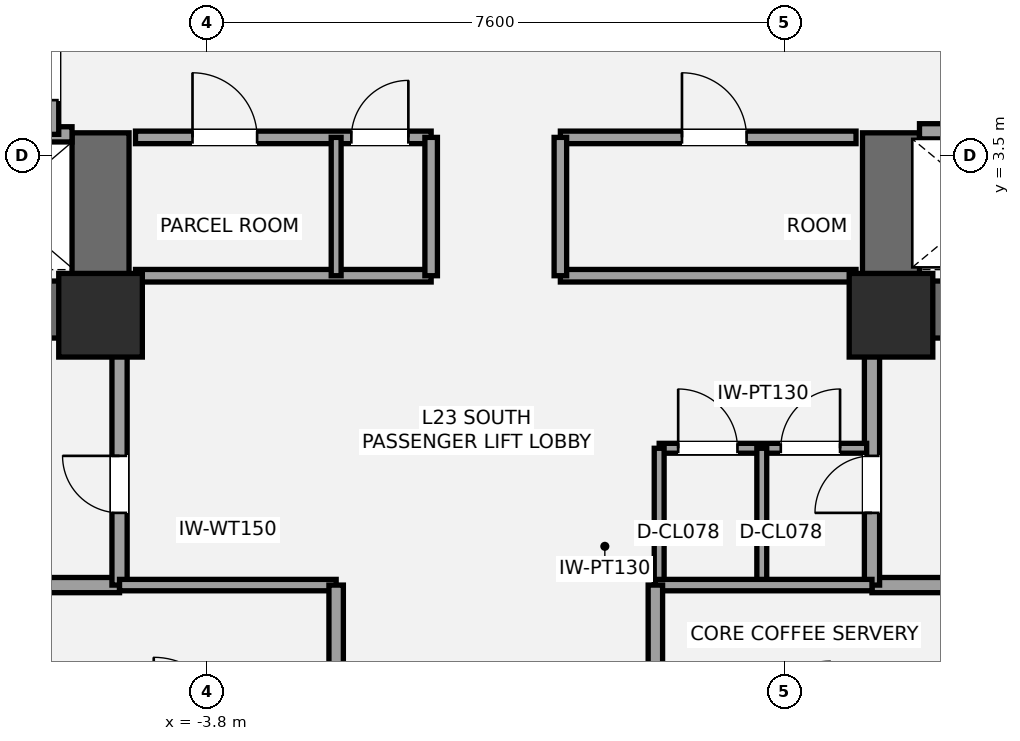
"""IFC4 building model, lengths in metres.
Left out: names, types, materials, properties, quantities, classifications, styles, units other than length and angle.
Written with IfcOpenShell. Run it as: python <this file> out.ifc"""

import sys

from ifc_helpers import new_model, si_unit, direction, frame, frame_2d, origin, origin_2d, place, context, subcontext, project, spatial, rectangle, extrude, element, fill, save


model = new_model("IFC4")
c1 = context("Model", 3, precision=1e-05, world=origin(), true_north=direction((0.0, 1.0)))
c2 = subcontext(c1, "Body", "Model", "MODEL_VIEW")
j1 = project(units=[si_unit("LENGTHUNIT", "METRE"), si_unit("PLANEANGLEUNIT", "RADIAN")], contexts=[c1])
p1 = place(None, origin())
s1 = spatial("IfcSite", under=j1, at=p1, CompositionType="ELEMENT")
p2 = place(p1, origin())
s2 = spatial("IfcBuilding", under=s1, at=p2, CompositionType="ELEMENT")
p3 = place(p2, frame((0.0, 0.0, 89.6)))
s3 = spatial("IfcBuildingStorey", under=s2, at=p3, CompositionType="ELEMENT", Elevation=89.6)
p4 = place(p3, frame((-4.825, 1.475, 0.0), z_axis=(0.0, 0.0, 1.0), x_axis=(-1.0, 0.0, 0.0)))
e1 = element("IfcWall", 1, at=p4, inside=s3, PredefinedType="SHEAR", context=c2, shape_type="SweptSolid", body=[
    extrude(rectangle(XDim=9.075, YDim=0.75, at=frame_2d((4.538, 0.0))), origin(), (0.0, 0.0, 1.0), 3.5),
])
p5 = place(p4, frame((5.475, 0.0, 0.0)))
e2 = element("IfcOpeningElement", 2, at=p5, cuts=e1, PredefinedType="OPENING", context=c2, shape_type="SweptSolid", body=[
    extrude(rectangle(XDim=1.05, YDim=2.15, at=frame_2d((0.525, 1.075))), frame((0.0, 0.385, 0.0), z_axis=(0.0, -1.0, 0.0), x_axis=(1.0, 0.0, 0.0)), (0.0, 0.0, 1.0), 0.77),
])
p6 = place(p4, frame((3.805, 0.0, 0.0)))
e3 = element("IfcOpeningElement", 3, at=p6, cuts=e1, PredefinedType="OPENING", context=c2, shape_type="SweptSolid", body=[
    extrude(rectangle(XDim=1.1, YDim=2.2, at=frame_2d((0.55, 1.1))), frame((0.0, 0.385, 0.0), z_axis=(0.0, -1.0, 0.0), x_axis=(1.0, 0.0, 0.0)), (0.0, 0.0, 1.0), 0.77),
])
p7 = place(p3, frame((-5.2, 1.1, 0.0), z_axis=(0.0, 0.0, 1.0), x_axis=(0.0, 1.0, 0.0)))
e4 = element("IfcWall", 4, at=p7, inside=s3, PredefinedType="SHEAR", context=c2, shape_type="SweptSolid", body=[
    extrude(rectangle(XDim=2.7, YDim=0.75, at=frame_2d((1.35, 0.0))), origin(), (0.0, 0.0, 1.0), 3.5),
])
p8 = place(p3, frame((13.9, 1.475, 0.0), z_axis=(0.0, 0.0, 1.0), x_axis=(-1.0, 0.0, 0.0)))
e5 = element("IfcWall", 5, at=p8, inside=s3, PredefinedType="SHEAR", context=c2, shape_type="SweptSolid", body=[
    extrude(rectangle(XDim=9.075, YDim=0.75, at=frame_2d((4.538, 0.0))), origin(), (0.0, 0.0, 1.0), 3.5),
])
p9 = place(p8, frame((2.55, 0.0, 0.0)))
e6 = element("IfcOpeningElement", 6, at=p9, cuts=e5, PredefinedType="OPENING", context=c2, shape_type="SweptSolid", body=[
    extrude(rectangle(XDim=1.05, YDim=2.15, at=frame_2d((0.525, 1.075))), frame((0.0, 0.385, 0.0), z_axis=(0.0, -1.0, 0.0), x_axis=(1.0, 0.0, 0.0)), (0.0, 0.0, 1.0), 0.77),
])
p10 = place(p8, frame((4.55, 0.0, 0.0)))
e7 = element("IfcOpeningElement", 7, at=p10, cuts=e5, PredefinedType="OPENING", context=c2, shape_type="SweptSolid", body=[
    extrude(rectangle(XDim=1.1, YDim=2.2, at=frame_2d((0.55, 1.1))), frame((0.0, 0.385, 0.0), z_axis=(0.0, -1.0, 0.0), x_axis=(1.0, 0.0, 0.0)), (0.0, 0.0, 1.0), 0.77),
])
p11 = place(p3, frame((5.2, 1.1, 0.0), z_axis=(0.0, 0.0, 1.0), x_axis=(0.0, 1.0, 0.0)))
e8 = element("IfcWall", 8, at=p11, inside=s3, PredefinedType="SHEAR", context=c2, shape_type="SweptSolid", body=[
    extrude(rectangle(XDim=2.7, YDim=0.75, at=frame_2d((1.35, 0.0))), origin(), (0.0, 0.0, 1.0), 3.5),
])
for number, where, z_axis, x_axis in (
    (9, (-5.2, 1.4, 0.0), (0.0, 0.0, 1.0), (1.0, 0.0, 0.0)),
    (10, (5.2, 1.4, 0.0), (0.0, 0.0, 1.0), (1.0, 0.0, 0.0)),
):
    element("IfcColumn", number, at=place(p3, frame(where, z_axis=z_axis, x_axis=x_axis)), inside=s3, PredefinedType="COLUMN", context=c2, shape_type="SweptSolid", body=[
        extrude(rectangle(XDim=1.1, YDim=1.1, at=origin_2d()), origin(), (0.0, 0.0, 1.0), 3.5),
    ])
p12 = place(p3, frame((-7.2, -2.15, 0.0), z_axis=(0.0, 0.0, 1.0), x_axis=(1.0, 0.0, 0.0)))
e11 = element("IfcWall", 11, at=p12, inside=s3, PredefinedType="SOLIDWALL", context=c2, shape_type="SweptSolid", body=[
    extrude(rectangle(XDim=2.25, YDim=0.2, at=frame_2d((1.125, 0.0))), origin(), (0.0, 0.0, 1.0), 2.763),
])
p13 = place(p3, frame((-4.95, -2.15, 0.0), z_axis=(0.0, 0.0, 1.0), x_axis=(0.0, 1.0, 0.0)))
e12 = element("IfcWall", 12, at=p13, inside=s3, PredefinedType="SOLIDWALL", context=c2, shape_type="SweptSolid", body=[
    extrude(rectangle(XDim=3.3, YDim=0.2, at=frame_2d((1.65, 0.0))), origin(), (0.0, 0.0, 1.0), 2.763),
])
p14 = place(p13, frame((0.95, 0.0, 0.0)))
e13 = element("IfcOpeningElement", 13, at=p14, cuts=e12, PredefinedType="OPENING", context=c2, shape_type="SweptSolid", body=[
    extrude(rectangle(XDim=0.75, YDim=2.1, at=frame_2d((0.375, 1.05))), frame((0.0, 0.11, 0.0), z_axis=(0.0, -1.0, 0.0), x_axis=(1.0, 0.0, 0.0)), (0.0, 0.0, 1.0), 0.22),
])
p15 = place(p3, frame((4.95, -2.15, 0.0), z_axis=(0.0, 0.0, 1.0), x_axis=(1.0, 0.0, 0.0)))
e14 = element("IfcWall", 14, at=p15, inside=s3, PredefinedType="SOLIDWALL", context=c2, shape_type="SweptSolid", body=[
    extrude(rectangle(XDim=2.25, YDim=0.2, at=frame_2d((1.125, 0.0))), origin(), (0.0, 0.0, 1.0), 3.31),
])
p16 = place(p3, frame((4.95, -2.15, 0.0), z_axis=(0.0, 0.0, 1.0), x_axis=(0.0, 1.0, 0.0)))
e15 = element("IfcWall", 15, at=p16, inside=s3, PredefinedType="SOLIDWALL", context=c2, shape_type="SweptSolid", body=[
    extrude(rectangle(XDim=3.3, YDim=0.2, at=frame_2d((1.65, 0.0))), origin(), (0.0, 0.0, 1.0), 2.763),
])
p17 = place(p16, frame((0.95, 0.0, 0.0)))
e16 = element("IfcOpeningElement", 16, at=p17, cuts=e15, PredefinedType="OPENING", context=c2, shape_type="SweptSolid", body=[
    extrude(rectangle(XDim=0.75, YDim=2.1, at=frame_2d((0.375, 1.05))), frame((0.0, 0.11, 0.0), z_axis=(0.0, -1.0, 0.0), x_axis=(1.0, 0.0, 0.0)), (0.0, 0.0, 1.0), 0.22),
])
p18 = place(p3, frame((2.15, -0.35, 0.0), z_axis=(0.0, 0.0, 1.0), x_axis=(1.0, 0.0, 0.0)))
e17 = element("IfcWall", 17, at=p18, inside=s3, PredefinedType="PARTITIONING", context=c2, shape_type="SweptSolid", body=[
    extrude(rectangle(XDim=2.73, YDim=0.13, at=frame_2d((1.365, 0.0))), origin(), (0.0, 0.0, 1.0), 3.31),
])
p19 = place(p18, frame((0.25, 0.0, 0.0)))
e18 = element("IfcOpeningElement", 18, at=p19, cuts=e17, PredefinedType="OPENING", context=c2, shape_type="SweptSolid", body=[
    extrude(rectangle(XDim=0.78, YDim=2.1, at=frame_2d((0.39, 1.05))), frame((0.0, 0.075, 0.0), z_axis=(0.0, -1.0, 0.0), x_axis=(1.0, 0.0, 0.0)), (0.0, 0.0, 1.0), 0.15),
])
p20 = place(p18, frame((1.6, 0.0, 0.0)))
e19 = element("IfcOpeningElement", 19, at=p20, cuts=e17, PredefinedType="OPENING", context=c2, shape_type="SweptSolid", body=[
    extrude(rectangle(XDim=0.78, YDim=2.1, at=frame_2d((0.39, 1.05))), frame((0.0, 0.075, 0.0), z_axis=(0.0, -1.0, 0.0), x_axis=(1.0, 0.0, 0.0)), (0.0, 0.0, 1.0), 0.15),
])
for number, where, z_axis, x_axis in (
    (20, (2.15, -2.15, 0.0), (0.0, 0.0, 1.0), (0.0, 1.0, 0.0)),
    (21, (3.5, -2.15, 0.0), (0.0, 0.0, 1.0), (0.0, 1.0, 0.0)),
):
    element("IfcWall", number, at=place(p3, frame(where, z_axis=z_axis, x_axis=x_axis)), inside=s3, PredefinedType="PARTITIONING", context=c2, shape_type="SweptSolid", body=[
        extrude(rectangle(XDim=1.8, YDim=0.13, at=frame_2d((0.9, 0.0))), origin(), (0.0, 0.0, 1.0), 3.31),
    ])
p21 = place(p3, frame((-9.78, 3.78, 0.0), z_axis=(0.0, 0.0, 1.0), x_axis=(1.0, 0.0, 0.0)))
e22 = element("IfcWall", 22, at=p21, inside=s3, PredefinedType="SOLIDWALL", context=c2, shape_type="SweptSolid", body=[
    extrude(rectangle(XDim=4.205, YDim=0.2, at=frame_2d((2.103, 0.0))), origin(), (0.0, 0.0, 1.0), 3.31),
])
p22 = place(p3, frame((-5.85, 3.78, 0.0), z_axis=(0.0, 0.0, 1.0), x_axis=(0.0, 1.0, 0.0)))
e23 = element("IfcWall", 23, at=p22, inside=s3, PredefinedType="SOLIDWALL", context=c2, shape_type="SweptSolid", body=[
    extrude(rectangle(XDim=1.69, YDim=0.2, at=frame_2d((0.845, 0.0))), origin(), (0.0, 0.0, 1.0), 3.31),
])
p23 = place(p22, frame((0.45, 0.0, 0.0)))
e24 = element("IfcOpeningElement", 24, at=p23, cuts=e23, PredefinedType="OPENING", context=c2, shape_type="SweptSolid", body=[
    extrude(rectangle(XDim=0.75, YDim=2.1, at=frame_2d((0.375, 1.05))), frame((0.0, 0.11, 0.0), z_axis=(0.0, -1.0, 0.0), x_axis=(1.0, 0.0, 0.0)), (0.0, 0.0, 1.0), 0.22),
])
p24 = place(p3, frame((5.575, 3.82, 0.0), z_axis=(0.0, 0.0, 1.0), x_axis=(1.0, 0.0, 0.0)))
e25 = element("IfcWall", 25, at=p24, inside=s3, PredefinedType="SOLIDWALL", context=c2, shape_type="SweptSolid", body=[
    extrude(rectangle(XDim=4.205, YDim=0.2, at=frame_2d((2.103, 0.0))), origin(), (0.0, 0.0, 1.0), 3.31),
])
p25 = place(p24, frame((0.65, 0.0, 0.0)))
e26 = element("IfcOpeningElement", 26, at=p25, cuts=e25, PredefinedType="OPENING", context=c2, shape_type="SweptSolid", body=[
    extrude(rectangle(XDim=1.2, YDim=2.2, at=frame_2d((0.6, 1.1))), frame((0.0, 0.11, 0.0), z_axis=(0.0, -1.0, 0.0), x_axis=(1.0, 0.0, 0.0)), (0.0, 0.0, 1.0), 0.22),
])
p26 = place(p3, frame((-4.74, 1.92, 0.0), z_axis=(0.0, 0.0, 1.0), x_axis=(1.0, 0.0, 0.0)))
e27 = element("IfcWall", 27, at=p26, inside=s3, PredefinedType="PARTITIONING", context=c2, shape_type="SweptSolid", body=[
    extrude(rectangle(XDim=3.89, YDim=0.165, at=frame_2d((1.945, 0.0))), origin(), (0.0, 0.0, 1.0), 2.3),
])
p27 = place(p3, frame((-4.74, 3.74, 0.0), z_axis=(0.0, 0.0, 1.0), x_axis=(1.0, 0.0, 0.0)))
e28 = element("IfcWall", 28, at=p27, inside=s3, PredefinedType="PARTITIONING", context=c2, shape_type="SweptSolid", body=[
    extrude(rectangle(XDim=3.89, YDim=0.165, at=frame_2d((1.945, 0.0))), origin(), (0.0, 0.0, 1.0), 3.31),
])
p28 = place(p27, frame((0.75, 0.0, 0.0)))
e29 = element("IfcOpeningElement", 29, at=p28, cuts=e28, PredefinedType="OPENING", context=c2, shape_type="SweptSolid", body=[
    extrude(rectangle(XDim=0.85, YDim=2.1, at=frame_2d((0.425, 1.05))), frame((0.0, 0.093, 0.0), z_axis=(0.0, -1.0, 0.0), x_axis=(1.0, 0.0, 0.0)), (0.0, 0.0, 1.0), 0.185),
])
p29 = place(p27, frame((2.84, 0.0, 0.0)))
e30 = element("IfcOpeningElement", 30, at=p29, cuts=e28, PredefinedType="OPENING", context=c2, shape_type="SweptSolid", body=[
    extrude(rectangle(XDim=0.75, YDim=2.1, at=frame_2d((0.375, 1.05))), frame((0.0, 0.093, 0.0), z_axis=(0.0, -1.0, 0.0), x_axis=(1.0, 0.0, 0.0)), (0.0, 0.0, 1.0), 0.185),
])
p30 = place(p3, frame((-0.85, 1.92, 0.0), z_axis=(0.0, 0.0, 1.0), x_axis=(0.0, 1.0, 0.0)))
e31 = element("IfcWall", 31, at=p30, inside=s3, PredefinedType="PARTITIONING", context=c2, shape_type="SweptSolid", body=[
    extrude(rectangle(XDim=1.82, YDim=0.165, at=frame_2d((0.91, 0.0))), origin(), (0.0, 0.0, 1.0), 3.31),
])
p31 = place(p3, frame((0.85, 1.92, 0.0), z_axis=(0.0, 0.0, 1.0), x_axis=(1.0, 0.0, 0.0)))
e32 = element("IfcWall", 32, at=p31, inside=s3, PredefinedType="PARTITIONING", context=c2, shape_type="SweptSolid", body=[
    extrude(rectangle(XDim=3.89, YDim=0.165, at=frame_2d((1.945, 0.0))), origin(), (0.0, 0.0, 1.0), 2.3),
])
p32 = place(p3, frame((0.85, 3.74, 0.0), z_axis=(0.0, 0.0, 1.0), x_axis=(1.0, 0.0, 0.0)))
e33 = element("IfcWall", 33, at=p32, inside=s3, PredefinedType="PARTITIONING", context=c2, shape_type="SweptSolid", body=[
    extrude(rectangle(XDim=3.89, YDim=0.165, at=frame_2d((1.945, 0.0))), origin(), (0.0, 0.0, 1.0), 3.31),
])
p33 = place(p32, frame((1.6, 0.0, 0.0)))
e34 = element("IfcOpeningElement", 34, at=p33, cuts=e33, PredefinedType="OPENING", context=c2, shape_type="SweptSolid", body=[
    extrude(rectangle(XDim=0.85, YDim=2.1, at=frame_2d((0.425, 1.05))), frame((0.0, 0.093, 0.0), z_axis=(0.0, -1.0, 0.0), x_axis=(1.0, 0.0, 0.0)), (0.0, 0.0, 1.0), 0.185),
])
p34 = place(p3, frame((0.85, 1.92, 0.0), z_axis=(0.0, 0.0, 1.0), x_axis=(0.0, 1.0, 0.0)))
e35 = element("IfcWall", 35, at=p34, inside=s3, PredefinedType="PARTITIONING", context=c2, shape_type="SweptSolid", body=[
    extrude(rectangle(XDim=1.82, YDim=0.165, at=frame_2d((0.91, 0.0))), origin(), (0.0, 0.0, 1.0), 3.31),
])
p35 = place(p3, frame((-2.1, 1.92, 0.0), z_axis=(0.0, 0.0, 1.0), x_axis=(0.0, 1.0, 0.0)))
e36 = element("IfcWall", 36, at=p35, inside=s3, PredefinedType="PARTITIONING", context=c2, shape_type="SweptSolid", body=[
    extrude(rectangle(XDim=1.82, YDim=0.13, at=frame_2d((0.91, 0.0))), origin(), (0.0, 0.0, 1.0), 3.31),
])
p36 = place(p3, frame((-4.95, -2.15, 0.0), z_axis=(0.0, 0.0, 1.0), x_axis=(1.0, 0.0, 0.0)))
e37 = element("IfcWall", 37, at=p36, inside=s3, PredefinedType="PLUMBINGWALL", context=c2, shape_type="SweptSolid", body=[
    extrude(rectangle(XDim=2.85, YDim=0.15, at=frame_2d((1.425, 0.0))), origin(), (0.0, 0.0, 1.0), 3.31),
])
p37 = place(p3, frame((-2.1, -4.05, 0.0), z_axis=(0.0, 0.0, 1.0), x_axis=(0.0, 1.0, 0.0)))
e38 = element("IfcWall", 38, at=p37, inside=s3, PredefinedType="PLUMBINGWALL", context=c2, shape_type="SweptSolid", body=[
    extrude(rectangle(XDim=1.9, YDim=0.19, at=frame_2d((0.95, 0.0))), origin(), (0.0, 0.0, 1.0), 3.31),
])
p38 = place(p3, frame((2.1, -2.15, 0.0), z_axis=(0.0, 0.0, 1.0), x_axis=(1.0, 0.0, 0.0)))
e39 = element("IfcWall", 39, at=p38, inside=s3, PredefinedType="PLUMBINGWALL", context=c2, shape_type="SweptSolid", body=[
    extrude(rectangle(XDim=2.85, YDim=0.15, at=frame_2d((1.425, 0.0))), origin(), (0.0, 0.0, 1.0), 3.31),
])
p39 = place(p3, frame((2.1, -4.05, 0.0), z_axis=(0.0, 0.0, 1.0), x_axis=(0.0, 1.0, 0.0)))
e40 = element("IfcWall", 40, at=p39, inside=s3, PredefinedType="PLUMBINGWALL", context=c2, shape_type="SweptSolid", body=[
    extrude(rectangle(XDim=1.9, YDim=0.19, at=frame_2d((0.95, 0.0))), origin(), (0.0, 0.0, 1.0), 3.31),
])
p40 = place(p14, origin())
e41 = element("IfcDoor", 41, at=p40, inside=s3, OperationType="SINGLE_SWING_RIGHT", PredefinedType="DOOR", context=c2, shape_type="SweptSolid", body=[
    extrude(rectangle(XDim=0.75, YDim=2.1, at=frame_2d((0.375, 1.05))), frame((0.0, 0.025, 0.0), z_axis=(0.0, -1.0, 0.0), x_axis=(1.0, 0.0, 0.0)), (0.0, 0.0, 1.0), 0.05),
])
fill(e13, e41)
p41 = place(p17, origin())
e42 = element("IfcDoor", 42, at=p41, inside=s3, OperationType="SINGLE_SWING_LEFT", PredefinedType="DOOR", context=c2, shape_type="SweptSolid", body=[
    extrude(rectangle(XDim=0.75, YDim=2.1, at=frame_2d((0.375, 1.05))), frame((0.0, 0.025, 0.0), z_axis=(0.0, -1.0, 0.0), x_axis=(1.0, 0.0, 0.0)), (0.0, 0.0, 1.0), 0.05),
])
fill(e16, e42)
p42 = place(p19, origin())
e43 = element("IfcDoor", 43, at=p42, inside=s3, OperationType="SINGLE_SWING_LEFT", PredefinedType="DOOR", context=c2, shape_type="SweptSolid", body=[
    extrude(rectangle(XDim=0.78, YDim=2.1, at=frame_2d((0.39, 1.05))), frame((0.0, 0.025, 0.0), z_axis=(0.0, -1.0, 0.0), x_axis=(1.0, 0.0, 0.0)), (0.0, 0.0, 1.0), 0.05),
])
fill(e18, e43)
p43 = place(p20, origin())
e44 = element("IfcDoor", 44, at=p43, inside=s3, OperationType="SINGLE_SWING_RIGHT", PredefinedType="DOOR", context=c2, shape_type="SweptSolid", body=[
    extrude(rectangle(XDim=0.78, YDim=2.1, at=frame_2d((0.39, 1.05))), frame((0.0, 0.025, 0.0), z_axis=(0.0, -1.0, 0.0), x_axis=(1.0, 0.0, 0.0)), (0.0, 0.0, 1.0), 0.05),
])
fill(e19, e44)
p44 = place(p23, origin())
e45 = element("IfcDoor", 45, at=p44, inside=s3, OperationType="SINGLE_SWING_RIGHT", PredefinedType="DOOR", context=c2, shape_type="SweptSolid", body=[
    extrude(rectangle(XDim=0.75, YDim=2.1, at=frame_2d((0.375, 1.05))), frame((0.0, 0.025, 0.0), z_axis=(0.0, -1.0, 0.0), x_axis=(1.0, 0.0, 0.0)), (0.0, 0.0, 1.0), 0.05),
])
fill(e24, e45)
p45 = place(p28, origin())
e46 = element("IfcDoor", 46, at=p45, inside=s3, OperationType="SINGLE_SWING_LEFT", PredefinedType="DOOR", context=c2, shape_type="SweptSolid", body=[
    extrude(rectangle(XDim=0.85, YDim=2.1, at=frame_2d((0.425, 1.05))), frame((0.0, 0.025, 0.0), z_axis=(0.0, -1.0, 0.0), x_axis=(1.0, 0.0, 0.0)), (0.0, 0.0, 1.0), 0.05),
])
fill(e29, e46)
p46 = place(p29, origin())
e47 = element("IfcDoor", 47, at=p46, inside=s3, OperationType="SINGLE_SWING_RIGHT", PredefinedType="DOOR", context=c2, shape_type="SweptSolid", body=[
    extrude(rectangle(XDim=0.75, YDim=2.1, at=frame_2d((0.375, 1.05))), frame((0.0, 0.025, 0.0), z_axis=(0.0, -1.0, 0.0), x_axis=(1.0, 0.0, 0.0)), (0.0, 0.0, 1.0), 0.05),
])
fill(e30, e47)
p47 = place(p33, origin())
e48 = element("IfcDoor", 48, at=p47, inside=s3, OperationType="SINGLE_SWING_LEFT", PredefinedType="DOOR", context=c2, shape_type="SweptSolid", body=[
    extrude(rectangle(XDim=0.85, YDim=2.1, at=frame_2d((0.425, 1.05))), frame((0.0, 0.025, 0.0), z_axis=(0.0, -1.0, 0.0), x_axis=(1.0, 0.0, 0.0)), (0.0, 0.0, 1.0), 0.05),
])
fill(e34, e48)
save(model, sys.argv[1])
